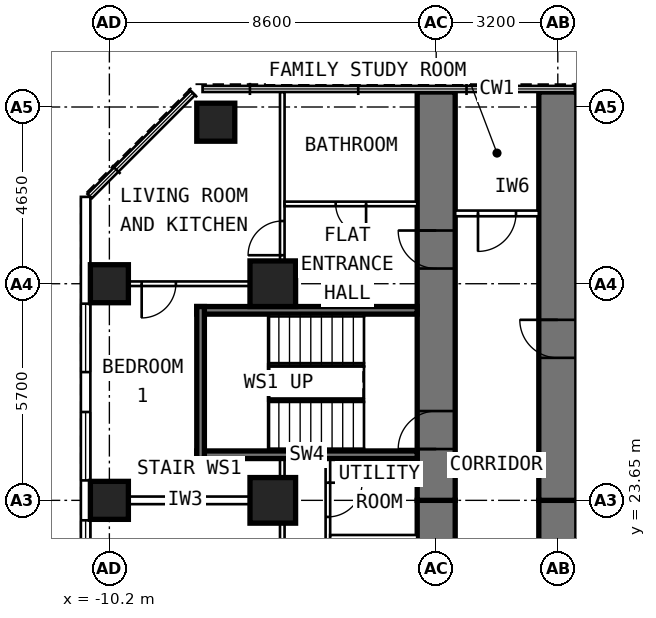
"""IFC4 building model, lengths in metres.
Left out: names, types, materials, properties, quantities, classifications, styles, units other than length and angle.
Written with IfcOpenShell. Run it as: python <this file> out.ifc"""

import sys

from ifc_helpers import new_model, si_unit, direction, frame, frame_2d, origin, origin_2d, place, context, subcontext, project, spatial, rectangle, extrude, element, fill, save


model = new_model("IFC4")
c1 = context("Model", 3, precision=1e-05, world=origin(), true_north=direction((0.0, 1.0)))
c2 = subcontext(c1, "Body", "Model", "MODEL_VIEW")
j1 = project(units=[si_unit("LENGTHUNIT", "METRE"), si_unit("PLANEANGLEUNIT", "RADIAN")], contexts=[c1])
p1 = place(None, origin())
s1 = spatial("IfcSite", under=j1, at=p1, CompositionType="ELEMENT")
p2 = place(p1, origin())
s2 = spatial("IfcBuilding", under=s1, at=p2, CompositionType="ELEMENT")
p3 = place(p2, frame((0.0, 0.0, 53.8)))
s3 = spatial("IfcBuildingStorey", under=s2, at=p3, CompositionType="ELEMENT", Elevation=53.8)
for number, where, z_axis, x_axis in (
    (1, (-10.2, 23.65, 0.0), (0.0, 0.0, 1.0), (0.0, 1.0, 0.0)),
    (2, (-10.2, 29.35, 0.0), (0.0, 0.0, 1.0), (0.0, 1.0, 0.0)),
    (3, (-7.4, 33.6, 0.0), (0.0, 0.0, 1.0), (0.0, 1.0, 0.0)),
):
    element("IfcColumn", number, at=place(p3, frame(where, z_axis=z_axis, x_axis=x_axis)), inside=s3, PredefinedType="COLUMN", context=c2, shape_type="SweptSolid", body=[
        extrude(rectangle(XDim=1.0, YDim=1.0, at=origin_2d()), origin(), (0.0, 0.0, 1.0), 3.6),
    ])
for number, where, z_axis, x_axis in (
    (4, (-5.9, 23.65, 0.0), (0.0, 0.0, 1.0), (0.0, 1.0, 0.0)),
    (5, (-5.9, 29.35, 0.0), (0.0, 0.0, 1.0), (0.0, 1.0, 0.0)),
):
    element("IfcColumn", number, at=place(p3, frame(where, z_axis=z_axis, x_axis=x_axis)), inside=s3, PredefinedType="COLUMN", context=c2, shape_type="SweptSolid", body=[
        extrude(rectangle(XDim=1.2, YDim=1.2, at=origin_2d()), origin(), (0.0, 0.0, 1.0), 3.6),
    ])
p4 = place(p3, frame((-1.6, 17.95, 0.0), z_axis=(0.0, 0.0, 1.0), x_axis=(0.0, 1.0, 0.0)))
e6 = element("IfcWall", 6, at=p4, inside=s3, PredefinedType="SHEAR", context=c2, shape_type="SweptSolid", body=[
    extrude(rectangle(XDim=5.7, YDim=1.0, at=frame_2d((2.85, 0.0))), origin(), (0.0, 0.0, 1.0), 3.6),
])
p5 = place(p3, frame((-1.6, 23.65, 0.0), z_axis=(0.0, 0.0, 1.0), x_axis=(0.0, 1.0, 0.0)))
e7 = element("IfcWall", 7, at=p5, inside=s3, PredefinedType="SHEAR", context=c2, shape_type="SweptSolid", body=[
    extrude(rectangle(XDim=10.745, YDim=1.0, at=frame_2d((5.373, 0.0))), origin(), (0.0, 0.0, 1.0), 3.6),
])
p6 = place(p5, frame((6.1, 0.0, 0.0)))
e8 = element("IfcOpeningElement", 8, at=p6, cuts=e7, PredefinedType="OPENING", context=c2, shape_type="SweptSolid", body=[
    extrude(rectangle(XDim=1.0, YDim=2.1, at=frame_2d((0.5, 1.05))), frame((0.0, 0.512, 0.0), z_axis=(0.0, -1.0, 0.0), x_axis=(1.0, 0.0, 0.0)), (0.0, 0.0, 1.0), 1.024),
])
p7 = place(p5, frame((1.35, 0.0, 0.0)))
e9 = element("IfcOpeningElement", 9, at=p7, cuts=e7, PredefinedType="OPENING", context=c2, shape_type="SweptSolid", body=[
    extrude(rectangle(XDim=1.0, YDim=2.1, at=frame_2d((0.5, 1.05))), frame((0.0, 0.512, 0.0), z_axis=(0.0, -1.0, 0.0), x_axis=(1.0, 0.0, 0.0)), (0.0, 0.0, 1.0), 1.024),
])
p8 = place(p3, frame((1.6, 17.95, 0.0), z_axis=(0.0, 0.0, 1.0), x_axis=(0.0, 1.0, 0.0)))
e10 = element("IfcWall", 10, at=p8, inside=s3, PredefinedType="SHEAR", context=c2, shape_type="SweptSolid", body=[
    extrude(rectangle(XDim=5.7, YDim=1.0, at=frame_2d((2.85, 0.0))), origin(), (0.0, 0.0, 1.0), 3.6),
])
p9 = place(p3, frame((1.6, 23.65, 0.0), z_axis=(0.0, 0.0, 1.0), x_axis=(0.0, 1.0, 0.0)))
e11 = element("IfcWall", 11, at=p9, inside=s3, PredefinedType="SHEAR", context=c2, shape_type="SweptSolid", body=[
    extrude(rectangle(XDim=10.745, YDim=1.0, at=frame_2d((5.373, 0.0))), origin(), (0.0, 0.0, 1.0), 3.6),
])
p10 = place(p9, frame((3.75, 0.0, 0.0)))
e12 = element("IfcOpeningElement", 12, at=p10, cuts=e11, PredefinedType="OPENING", context=c2, shape_type="SweptSolid", body=[
    extrude(rectangle(XDim=1.0, YDim=2.1, at=frame_2d((0.5, 1.05))), frame((0.0, 0.512, 0.0), z_axis=(0.0, -1.0, 0.0), x_axis=(1.0, 0.0, 0.0)), (0.0, 0.0, 1.0), 1.024),
])
p11 = place(p3, frame((-10.825, 6.148, 0.0), z_axis=(0.0, 0.0, 1.0), x_axis=(0.0, 1.0, 0.0)))
e13 = element("IfcWall", 13, at=p11, inside=s3, PredefinedType="SOLIDWALL", context=c2, shape_type="SweptSolid", body=[
    extrude(rectangle(XDim=25.487, YDim=0.25, at=frame_2d((12.744, 0.0))), origin(), (0.0, 0.0, 1.0), 3.35),
])
p12 = place(p11, frame((0.927, 0.0, 0.8)))
e14 = element("IfcOpeningElement", 14, at=p12, cuts=e13, PredefinedType="OPENING", context=c2, shape_type="SweptSolid", body=[
    extrude(rectangle(XDim=1.8, YDim=1.8, at=frame_2d((0.9, 0.9))), frame((0.0, 0.137, 0.0), z_axis=(0.0, -1.0, 0.0), x_axis=(1.0, 0.0, 0.0)), (0.0, 0.0, 1.0), 0.274),
])
p13 = place(p11, frame((3.777, 0.0, 0.8)))
e15 = element("IfcOpeningElement", 15, at=p13, cuts=e13, PredefinedType="OPENING", context=c2, shape_type="SweptSolid", body=[
    extrude(rectangle(XDim=1.8, YDim=1.8, at=frame_2d((0.9, 0.9))), frame((0.0, 0.137, 0.0), z_axis=(0.0, -1.0, 0.0), x_axis=(1.0, 0.0, 0.0)), (0.0, 0.0, 1.0), 0.274),
])
p14 = place(p11, frame((6.627, 0.0, 0.8)))
e16 = element("IfcOpeningElement", 16, at=p14, cuts=e13, PredefinedType="OPENING", context=c2, shape_type="SweptSolid", body=[
    extrude(rectangle(XDim=1.8, YDim=1.8, at=frame_2d((0.9, 0.9))), frame((0.0, 0.137, 0.0), z_axis=(0.0, -1.0, 0.0), x_axis=(1.0, 0.0, 0.0)), (0.0, 0.0, 1.0), 0.274),
])
p15 = place(p11, frame((9.477, 0.0, 0.8)))
e17 = element("IfcOpeningElement", 17, at=p15, cuts=e13, PredefinedType="OPENING", context=c2, shape_type="SweptSolid", body=[
    extrude(rectangle(XDim=1.8, YDim=1.8, at=frame_2d((0.9, 0.9))), frame((0.0, 0.137, 0.0), z_axis=(0.0, -1.0, 0.0), x_axis=(1.0, 0.0, 0.0)), (0.0, 0.0, 1.0), 0.274),
])
p16 = place(p11, frame((12.327, 0.0, 0.8)))
e18 = element("IfcOpeningElement", 18, at=p16, cuts=e13, PredefinedType="OPENING", context=c2, shape_type="SweptSolid", body=[
    extrude(rectangle(XDim=1.8, YDim=1.8, at=frame_2d((0.9, 0.9))), frame((0.0, 0.137, 0.0), z_axis=(0.0, -1.0, 0.0), x_axis=(1.0, 0.0, 0.0)), (0.0, 0.0, 1.0), 0.274),
])
p17 = place(p11, frame((15.177, 0.0, 0.8)))
e19 = element("IfcOpeningElement", 19, at=p17, cuts=e13, PredefinedType="OPENING", context=c2, shape_type="SweptSolid", body=[
    extrude(rectangle(XDim=1.8, YDim=1.8, at=frame_2d((0.9, 0.9))), frame((0.0, 0.137, 0.0), z_axis=(0.0, -1.0, 0.0), x_axis=(1.0, 0.0, 0.0)), (0.0, 0.0, 1.0), 0.274),
])
p18 = place(p11, frame((18.027, 0.0, 0.8)))
e20 = element("IfcOpeningElement", 20, at=p18, cuts=e13, PredefinedType="OPENING", context=c2, shape_type="SweptSolid", body=[
    extrude(rectangle(XDim=1.8, YDim=1.8, at=frame_2d((0.9, 0.9))), frame((0.0, 0.137, 0.0), z_axis=(0.0, -1.0, 0.0), x_axis=(1.0, 0.0, 0.0)), (0.0, 0.0, 1.0), 0.274),
])
p19 = place(p11, frame((20.877, 0.0, 0.8)))
e21 = element("IfcOpeningElement", 21, at=p19, cuts=e13, PredefinedType="OPENING", context=c2, shape_type="SweptSolid", body=[
    extrude(rectangle(XDim=1.8, YDim=1.8, at=frame_2d((0.9, 0.9))), frame((0.0, 0.137, 0.0), z_axis=(0.0, -1.0, 0.0), x_axis=(1.0, 0.0, 0.0)), (0.0, 0.0, 1.0), 0.274),
])
p20 = place(p3, frame((-4.45, 10.1, 0.0), z_axis=(0.0, 0.0, 1.0), x_axis=(0.0, 1.0, 0.0)))
e22 = element("IfcWall", 22, at=p20, inside=s3, PredefinedType="PARTITIONING", context=c2, shape_type="SweptSolid", body=[
    extrude(rectangle(XDim=14.65, YDim=0.12, at=frame_2d((7.325, 0.0))), origin(), (0.0, 0.0, 1.0), 3.35),
])
p21 = place(p20, frame((0.375, 0.0, 0.0)))
e23 = element("IfcOpeningElement", 23, at=p21, cuts=e22, PredefinedType="OPENING", context=c2, shape_type="SweptSolid", body=[
    extrude(rectangle(XDim=0.9, YDim=2.1, at=frame_2d((0.45, 1.05))), frame((0.0, 0.072, 0.0), z_axis=(0.0, -1.0, 0.0), x_axis=(1.0, 0.0, 0.0)), (0.0, 0.0, 1.0), 0.144),
])
p22 = place(p20, frame((2.275, 0.0, 0.0)))
e24 = element("IfcOpeningElement", 24, at=p22, cuts=e22, PredefinedType="OPENING", context=c2, shape_type="SweptSolid", body=[
    extrude(rectangle(XDim=0.8, YDim=2.1, at=frame_2d((0.4, 1.05))), frame((0.0, 0.072, 0.0), z_axis=(0.0, -1.0, 0.0), x_axis=(1.0, 0.0, 0.0)), (0.0, 0.0, 1.0), 0.144),
])
p23 = place(p20, frame((4.075, 0.0, 0.0)))
e25 = element("IfcOpeningElement", 25, at=p23, cuts=e22, PredefinedType="OPENING", context=c2, shape_type="SweptSolid", body=[
    extrude(rectangle(XDim=0.9, YDim=2.1, at=frame_2d((0.45, 1.05))), frame((0.0, 0.072, 0.0), z_axis=(0.0, -1.0, 0.0), x_axis=(1.0, 0.0, 0.0)), (0.0, 0.0, 1.0), 0.144),
])
p24 = place(p20, frame((6.1, 0.0, 0.0)))
e26 = element("IfcOpeningElement", 26, at=p24, cuts=e22, PredefinedType="OPENING", context=c2, shape_type="SweptSolid", body=[
    extrude(rectangle(XDim=0.9, YDim=2.1, at=frame_2d((0.45, 1.05))), frame((0.0, 0.072, 0.0), z_axis=(0.0, -1.0, 0.0), x_axis=(1.0, 0.0, 0.0)), (0.0, 0.0, 1.0), 0.144),
])
p25 = place(p20, frame((8.729, 0.0, 0.0)))
e27 = element("IfcOpeningElement", 27, at=p25, cuts=e22, PredefinedType="OPENING", context=c2, shape_type="SweptSolid", body=[
    extrude(rectangle(XDim=0.8, YDim=2.1, at=frame_2d((0.4, 1.05))), frame((0.0, 0.072, 0.0), z_axis=(0.0, -1.0, 0.0), x_axis=(1.0, 0.0, 0.0)), (0.0, 0.0, 1.0), 0.144),
])
p26 = place(p20, frame((11.193, 0.0, 0.0)))
e28 = element("IfcOpeningElement", 28, at=p26, cuts=e22, PredefinedType="OPENING", context=c2, shape_type="SweptSolid", body=[
    extrude(rectangle(XDim=0.8, YDim=2.1, at=frame_2d((0.4, 1.05))), frame((0.0, 0.072, 0.0), z_axis=(0.0, -1.0, 0.0), x_axis=(1.0, 0.0, 0.0)), (0.0, 0.0, 1.0), 0.144),
])
p27 = place(p20, frame((13.114, 0.0, 0.0)))
e29 = element("IfcOpeningElement", 29, at=p27, cuts=e22, PredefinedType="OPENING", context=c2, shape_type="SweptSolid", body=[
    extrude(rectangle(XDim=0.9, YDim=2.1, at=frame_2d((0.45, 1.05))), frame((0.0, 0.072, 0.0), z_axis=(0.0, -1.0, 0.0), x_axis=(1.0, 0.0, 0.0)), (0.0, 0.0, 1.0), 0.144),
])
p28 = place(p3, frame((-5.65, 9.6, 0.0), z_axis=(0.0, 0.0, 1.0), x_axis=(0.0, 1.0, 0.0)))
e30 = element("IfcWall", 30, at=p28, inside=s3, PredefinedType="PARTITIONING", context=c2, shape_type="SweptSolid", body=[
    extrude(rectangle(XDim=15.15, YDim=0.12, at=frame_2d((7.575, 0.0))), origin(), (0.0, 0.0, 1.0), 3.35),
])
p29 = place(p28, frame((1.0, 0.0, 0.0)))
e31 = element("IfcOpeningElement", 31, at=p29, cuts=e30, PredefinedType="OPENING", context=c2, shape_type="SweptSolid", body=[
    extrude(rectangle(XDim=0.9, YDim=2.1, at=frame_2d((0.45, 1.05))), frame((0.0, 0.072, 0.0), z_axis=(0.0, -1.0, 0.0), x_axis=(1.0, 0.0, 0.0)), (0.0, 0.0, 1.0), 0.144),
])
p30 = place(p28, frame((3.625, 0.0, 0.0)))
e32 = element("IfcOpeningElement", 32, at=p30, cuts=e30, PredefinedType="OPENING", context=c2, shape_type="SweptSolid", body=[
    extrude(rectangle(XDim=0.9, YDim=2.1, at=frame_2d((0.45, 1.05))), frame((0.0, 0.072, 0.0), z_axis=(0.0, -1.0, 0.0), x_axis=(1.0, 0.0, 0.0)), (0.0, 0.0, 1.0), 0.144),
])
p31 = place(p28, frame((6.475, 0.0, 0.0)))
e33 = element("IfcOpeningElement", 33, at=p31, cuts=e30, PredefinedType="OPENING", context=c2, shape_type="SweptSolid", body=[
    extrude(rectangle(XDim=0.9, YDim=2.1, at=frame_2d((0.45, 1.05))), frame((0.0, 0.072, 0.0), z_axis=(0.0, -1.0, 0.0), x_axis=(1.0, 0.0, 0.0)), (0.0, 0.0, 1.0), 0.144),
])
p32 = place(p28, frame((10.75, 0.0, 0.0)))
e34 = element("IfcOpeningElement", 34, at=p32, cuts=e30, PredefinedType="OPENING", context=c2, shape_type="SweptSolid", body=[
    extrude(rectangle(XDim=0.9, YDim=2.1, at=frame_2d((0.45, 1.05))), frame((0.0, 0.072, 0.0), z_axis=(0.0, -1.0, 0.0), x_axis=(1.0, 0.0, 0.0)), (0.0, 0.0, 1.0), 0.144),
])
p33 = place(p3, frame((-2.1, 22.678, 0.0), z_axis=(0.0, 0.0, 1.0), x_axis=(-1.0, 0.0, 0.0)))
e35 = element("IfcWall", 35, at=p33, inside=s3, PredefinedType="PARTITIONING", context=c2, shape_type="SweptSolid", body=[
    extrude(rectangle(XDim=2.29, YDim=0.12, at=frame_2d((1.145, 0.0))), origin(), (0.0, 0.0, 1.0), 3.35),
])
p34 = place(p3, frame((-5.71, 23.65, 0.0), z_axis=(0.0, 0.0, 1.0), x_axis=(-1.0, 0.0, 0.0)))
e36 = element("IfcWall", 36, at=p34, inside=s3, PredefinedType="PARTITIONING", context=c2, shape_type="SweptSolid", body=[
    extrude(rectangle(XDim=4.99, YDim=0.2, at=frame_2d((2.495, 0.0))), origin(), (0.0, 0.0, 1.0), 2.45),
])
p35 = place(p3, frame((-5.71, 29.35, 0.0), z_axis=(0.0, 0.0, 1.0), x_axis=(-1.0, 0.0, 0.0)))
e37 = element("IfcWall", 37, at=p35, inside=s3, PredefinedType="PARTITIONING", context=c2, shape_type="SweptSolid", body=[
    extrude(rectangle(XDim=4.99, YDim=0.12, at=frame_2d((2.495, 0.0))), origin(), (0.0, 0.0, 1.0), 2.45),
])
p36 = place(p35, frame((2.74, 0.0, 0.0)))
e38 = element("IfcOpeningElement", 38, at=p36, cuts=e37, PredefinedType="OPENING", context=c2, shape_type="SweptSolid", body=[
    extrude(rectangle(XDim=0.9, YDim=2.1, at=frame_2d((0.45, 1.05))), frame((0.0, 0.072, 0.0), z_axis=(0.0, -1.0, 0.0), x_axis=(1.0, 0.0, 0.0)), (0.0, 0.0, 1.0), 0.144),
])
p37 = place(p3, frame((-5.65, 28.95, 0.0), z_axis=(0.0, 0.0, 1.0), x_axis=(0.0, 1.0, 0.0)))
e39 = element("IfcWall", 39, at=p37, inside=s3, PredefinedType="PARTITIONING", context=c2, shape_type="SweptSolid", body=[
    extrude(rectangle(XDim=5.445, YDim=0.12, at=frame_2d((2.723, 0.0))), origin(), (0.0, 0.0, 1.0), 3.35),
])
p38 = place(p37, frame((1.15, 0.0, 0.0)))
e40 = element("IfcOpeningElement", 40, at=p38, cuts=e39, PredefinedType="OPENING", context=c2, shape_type="SweptSolid", body=[
    extrude(rectangle(XDim=0.9, YDim=2.1, at=frame_2d((0.45, 1.05))), frame((0.0, 0.072, 0.0), z_axis=(0.0, -1.0, 0.0), x_axis=(1.0, 0.0, 0.0)), (0.0, 0.0, 1.0), 0.144),
])
p39 = place(p3, frame((-2.1, 31.45, 0.0), z_axis=(0.0, 0.0, 1.0), x_axis=(-1.0, 0.0, 0.0)))
e41 = element("IfcWall", 41, at=p39, inside=s3, PredefinedType="PARTITIONING", context=c2, shape_type="SweptSolid", body=[
    extrude(rectangle(XDim=3.49, YDim=0.12, at=frame_2d((1.745, 0.0))), origin(), (0.0, 0.0, 1.0), 3.35),
])
p40 = place(p39, frame((1.345, 0.0, 0.0)))
e42 = element("IfcOpeningElement", 42, at=p40, cuts=e41, PredefinedType="OPENING", context=c2, shape_type="SweptSolid", body=[
    extrude(rectangle(XDim=0.8, YDim=2.1, at=frame_2d((0.4, 1.05))), frame((0.0, 0.072, 0.0), z_axis=(0.0, -1.0, 0.0), x_axis=(1.0, 0.0, 0.0)), (0.0, 0.0, 1.0), 0.144),
])
p41 = place(p3, frame((2.1, 26.5, 0.0), z_axis=(0.0, 0.0, 1.0), x_axis=(1.0, 0.0, 0.0)))
e43 = element("IfcWall", 43, at=p41, inside=s3, PredefinedType="PARTITIONING", context=c2, shape_type="SweptSolid", body=[
    extrude(rectangle(XDim=8.6, YDim=0.2, at=frame_2d((4.3, 0.0))), origin(), (0.0, 0.0, 1.0), 3.35),
])
p42 = place(p3, frame((1.1, 31.2, 0.0), z_axis=(0.0, 0.0, 1.0), x_axis=(-1.0, 0.0, 0.0)))
e44 = element("IfcWall", 44, at=p42, inside=s3, PredefinedType="PARTITIONING", context=c2, shape_type="SweptSolid", body=[
    extrude(rectangle(XDim=2.2, YDim=0.15, at=frame_2d((1.1, 0.0))), origin(), (0.0, 0.0, 1.0), 3.35),
])
p43 = place(p42, frame((0.6, 0.0, 0.0)))
e45 = element("IfcOpeningElement", 45, at=p43, cuts=e44, PredefinedType="OPENING", context=c2, shape_type="SweptSolid", body=[
    extrude(rectangle(XDim=1.0, YDim=2.1, at=frame_2d((0.5, 1.05))), frame((0.0, 0.087, 0.0), z_axis=(0.0, -1.0, 0.0), x_axis=(1.0, 0.0, 0.0)), (0.0, 0.0, 1.0), 0.174),
])
for number, where, z_axis, x_axis in (
    (46, (-2.1, 24.85, 0.0), (0.0, 0.0, 1.0), (-1.0, 0.0, 0.0)),
    (47, (-2.1, 28.65, 0.0), (0.0, 0.0, 1.0), (-1.0, 0.0, 0.0)),
):
    element("IfcWall", number, at=place(p3, frame(where, z_axis=z_axis, x_axis=x_axis)), inside=s3, PredefinedType="SHEAR", context=c2, shape_type="SweptSolid", body=[
        extrude(rectangle(XDim=5.8, YDim=0.2, at=frame_2d((2.9, 0.0))), origin(), (0.0, 0.0, 1.0), 3.33),
    ])
p44 = place(p3, frame((-7.8, 24.75, 0.0), z_axis=(0.0, 0.0, 1.0), x_axis=(0.0, 1.0, 0.0)))
e48 = element("IfcWall", 48, at=p44, inside=s3, PredefinedType="SHEAR", context=c2, shape_type="SweptSolid", body=[
    extrude(rectangle(XDim=4.0, YDim=0.2, at=frame_2d((2.0, 0.0))), origin(), (0.0, 0.0, 1.0), 3.33),
])
p45 = place(p17, origin())
e49 = element("IfcWindow", 49, at=p45, inside=s3, PartitioningType="SINGLE_PANEL", PredefinedType="WINDOW", context=c2, shape_type="SweptSolid", body=[
    extrude(rectangle(XDim=1.8, YDim=1.8, at=frame_2d((0.9, 0.9))), frame((0.0, 0.03, 0.0), z_axis=(0.0, -1.0, 0.0), x_axis=(1.0, 0.0, 0.0)), (0.0, 0.0, 1.0), 0.06),
])
fill(e19, e49)
p46 = place(p18, origin())
e50 = element("IfcWindow", 50, at=p46, inside=s3, PartitioningType="SINGLE_PANEL", PredefinedType="WINDOW", context=c2, shape_type="SweptSolid", body=[
    extrude(rectangle(XDim=1.8, YDim=1.8, at=frame_2d((0.9, 0.9))), frame((0.0, 0.03, 0.0), z_axis=(0.0, -1.0, 0.0), x_axis=(1.0, 0.0, 0.0)), (0.0, 0.0, 1.0), 0.06),
])
fill(e20, e50)
p47 = place(p19, origin())
e51 = element("IfcWindow", 51, at=p47, inside=s3, PartitioningType="SINGLE_PANEL", PredefinedType="WINDOW", context=c2, shape_type="SweptSolid", body=[
    extrude(rectangle(XDim=1.8, YDim=1.8, at=frame_2d((0.9, 0.9))), frame((0.0, 0.03, 0.0), z_axis=(0.0, -1.0, 0.0), x_axis=(1.0, 0.0, 0.0)), (0.0, 0.0, 1.0), 0.06),
])
fill(e21, e51)
p48 = place(p27, frame((0.9, 0.0, 0.0), z_axis=(0.0, 0.0, 1.0), x_axis=(-1.0, 0.0, 0.0)))
e52 = element("IfcDoor", 52, at=p48, inside=s3, OperationType="SINGLE_SWING_LEFT", PredefinedType="DOOR", context=c2, shape_type="SweptSolid", body=[
    extrude(rectangle(XDim=0.9, YDim=2.1, at=frame_2d((0.45, 1.05))), frame((0.0, 0.025, 0.0), z_axis=(0.0, -1.0, 0.0), x_axis=(1.0, 0.0, 0.0)), (0.0, 0.0, 1.0), 0.05),
])
fill(e29, e52)
p49 = place(p36, origin())
e53 = element("IfcDoor", 53, at=p49, inside=s3, OperationType="SINGLE_SWING_RIGHT", PredefinedType="DOOR", context=c2, shape_type="SweptSolid", body=[
    extrude(rectangle(XDim=0.9, YDim=2.1, at=frame_2d((0.45, 1.05))), frame((0.0, 0.025, 0.0), z_axis=(0.0, -1.0, 0.0), x_axis=(1.0, 0.0, 0.0)), (0.0, 0.0, 1.0), 0.05),
])
fill(e38, e53)
p50 = place(p38, origin())
e54 = element("IfcDoor", 54, at=p50, inside=s3, OperationType="SINGLE_SWING_LEFT", PredefinedType="DOOR", context=c2, shape_type="SweptSolid", body=[
    extrude(rectangle(XDim=0.9, YDim=2.1, at=frame_2d((0.45, 1.05))), frame((0.0, 0.025, 0.0), z_axis=(0.0, -1.0, 0.0), x_axis=(1.0, 0.0, 0.0)), (0.0, 0.0, 1.0), 0.05),
])
fill(e40, e54)
p51 = place(p40, origin())
e55 = element("IfcDoor", 55, at=p51, inside=s3, OperationType="SINGLE_SWING_LEFT", PredefinedType="DOOR", context=c2, shape_type="SweptSolid", body=[
    extrude(rectangle(XDim=0.8, YDim=2.1, at=frame_2d((0.4, 1.05))), frame((0.0, 0.025, 0.0), z_axis=(0.0, -1.0, 0.0), x_axis=(1.0, 0.0, 0.0)), (0.0, 0.0, 1.0), 0.05),
])
fill(e42, e55)
p52 = place(p6, origin())
e56 = element("IfcDoor", 56, at=p52, inside=s3, OperationType="SINGLE_SWING_RIGHT", PredefinedType="DOOR", context=c2, shape_type="SweptSolid", body=[
    extrude(rectangle(XDim=1.0, YDim=2.1, at=frame_2d((0.5, 1.05))), frame((0.0, 0.25, 0.0), z_axis=(0.0, -1.0, 0.0), x_axis=(1.0, 0.0, 0.0)), (0.0, 0.0, 1.0), 0.5),
])
fill(e8, e56)
p53 = place(p10, origin())
e57 = element("IfcDoor", 57, at=p53, inside=s3, OperationType="SINGLE_SWING_RIGHT", PredefinedType="DOOR", context=c2, shape_type="SweptSolid", body=[
    extrude(rectangle(XDim=1.0, YDim=2.1, at=frame_2d((0.5, 1.05))), frame((0.0, 0.25, 0.0), z_axis=(0.0, -1.0, 0.0), x_axis=(1.0, 0.0, 0.0)), (0.0, 0.0, 1.0), 0.5),
])
fill(e12, e57)
p54 = place(p43, origin())
e58 = element("IfcDoor", 58, at=p54, inside=s3, OperationType="SINGLE_SWING_RIGHT", PredefinedType="DOOR", context=c2, shape_type="SweptSolid", body=[
    extrude(rectangle(XDim=1.0, YDim=2.1, at=frame_2d((0.5, 1.05))), frame((0.0, 0.025, 0.0), z_axis=(0.0, -1.0, 0.0), x_axis=(1.0, 0.0, 0.0)), (0.0, 0.0, 1.0), 0.05),
])
fill(e45, e58)
p55 = place(p7, origin())
e59 = element("IfcDoor", 59, at=p55, inside=s3, OperationType="SINGLE_SWING_LEFT", PredefinedType="DOOR", context=c2, shape_type="SweptSolid", body=[
    extrude(rectangle(XDim=1.0, YDim=2.1, at=frame_2d((0.5, 1.05))), frame((0.0, 0.25, 0.0), z_axis=(0.0, -1.0, 0.0), x_axis=(1.0, 0.0, 0.0)), (0.0, 0.0, 1.0), 0.5),
])
fill(e9, e59)
save(model, sys.argv[1])
